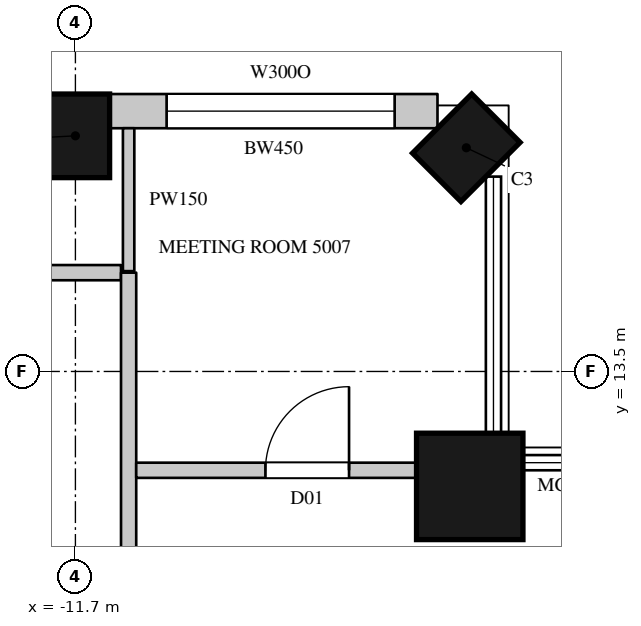
"""IFC4 building model, lengths in metres.
Left out: names, types, materials, properties, quantities, classifications, styles, units other than length and angle.
Written with IfcOpenShell. Run it as: python <this file> out.ifc"""

import sys

from ifc_helpers import new_model, si_unit, direction, frame, frame_2d, origin, origin_2d, place, context, subcontext, project, spatial, rectangle, circle, extrude, element, fill, save


model = new_model("IFC4")
c1 = context("Model", 3, precision=1e-05, world=origin(), true_north=direction((0.0, 1.0)))
c2 = subcontext(c1, "Body", "Model", "MODEL_VIEW")
j1 = project(units=[si_unit("LENGTHUNIT", "METRE"), si_unit("PLANEANGLEUNIT", "RADIAN")], contexts=[c1])
p1 = place(None, origin())
s1 = spatial("IfcSite", under=j1, at=p1, CompositionType="ELEMENT")
p2 = place(p1, origin())
s2 = spatial("IfcBuilding", under=s1, at=p2, CompositionType="ELEMENT")
p3 = place(p2, frame((0.0, 0.0, 226.1)))
s3 = spatial("IfcBuildingStorey", under=s2, at=p3, CompositionType="ELEMENT", Elevation=226.1)
p4 = place(p3, frame((-6.512, 11.988, 0.0), z_axis=(0.0, 0.0, 1.0), x_axis=(1.0, 0.0, 0.0)))
e1 = element("IfcColumn", 1, at=p4, inside=s3, PredefinedType="COLUMN", context=c2, shape_type="SweptSolid", body=[
    extrude(circle(Radius=0.7, at=origin_2d()), origin(), (0.0, 0.0, 1.0), 4.1),
])
for number, where, z_axis, x_axis in (
    (2, (-6.557, 16.443, 0.0), (0.0, 0.0, 1.0), (-0.707, 0.707, 0.0)),
    (3, (-11.7, 16.6, 0.0), (0.0, 0.0, 1.0), (-1.0, 0.0, 0.0)),
):
    element("IfcColumn", number, at=place(p3, frame(where, z_axis=z_axis, x_axis=x_axis)), inside=s3, PredefinedType="COLUMN", context=c2, shape_type="SweptSolid", body=[
        extrude(rectangle(XDim=0.9, YDim=1.1, at=origin_2d()), origin(), (0.0, 0.0, 1.0), 4.1),
    ])
p5 = place(p3, frame((-6.936, 16.925, 0.0), z_axis=(0.0, 0.0, 1.0), x_axis=(-1.0, 0.0, 0.0)))
e4 = element("IfcWall", 4, at=p5, inside=s3, PredefinedType="SOLIDWALL", context=c2, shape_type="SweptSolid", body=[
    extrude(rectangle(XDim=4.314, YDim=0.45, at=frame_2d((2.157, 0.0))), origin(), (0.0, 0.0, 1.0), 3.8),
])
p6 = place(p5, frame((0.564, 0.0, 1.05)))
e5 = element("IfcOpeningElement", 5, at=p6, cuts=e4, PredefinedType="OPENING", context=c2, shape_type="SweptSolid", body=[
    extrude(rectangle(XDim=3.0, YDim=2.4, at=frame_2d((1.5, 1.2))), frame((0.0, 0.235, 0.0), z_axis=(0.0, -1.0, 0.0), x_axis=(1.0, 0.0, 0.0)), (0.0, 0.0, 1.0), 0.47),
])
p7 = place(p3, frame((-13.97, 14.8, 0.0), z_axis=(0.0, 0.0, 1.0), x_axis=(1.0, 0.0, 0.0)))
e6 = element("IfcWall", 6, at=p7, inside=s3, PredefinedType="PARTITIONING", context=c2, shape_type="SweptSolid", body=[
    extrude(rectangle(XDim=2.87, YDim=0.2, at=frame_2d((1.435, 0.0))), origin(), (0.0, 0.0, 1.0), 3.8),
])
p8 = place(p3, frame((-11.0, -14.8, 0.0), z_axis=(0.0, 0.0, 1.0), x_axis=(0.0, 1.0, 0.0)))
e7 = element("IfcWall", 7, at=p8, inside=s3, PredefinedType="PARTITIONING", context=c2, shape_type="SweptSolid", body=[
    extrude(rectangle(XDim=29.6, YDim=0.2, at=frame_2d((14.8, 0.0))), origin(), (0.0, 0.0, 1.0), 3.8),
])
p9 = place(p8, frame((14.45, 0.0, 0.0)))
e8 = element("IfcOpeningElement", 8, at=p9, cuts=e7, PredefinedType="OPENING", context=c2, shape_type="SweptSolid", body=[
    extrude(rectangle(XDim=1.5, YDim=2.4, at=frame_2d((0.75, 1.2))), frame((0.0, 0.11, 0.0), z_axis=(0.0, -1.0, 0.0), x_axis=(1.0, 0.0, 0.0)), (0.0, 0.0, 1.0), 0.22),
])
p10 = place(p3, frame((-10.9, 12.2, 0.0), z_axis=(0.0, 0.0, 1.0), x_axis=(1.0, 0.0, 0.0)))
e9 = element("IfcWall", 9, at=p10, inside=s3, PredefinedType="PARTITIONING", context=c2, shape_type="SweptSolid", body=[
    extrude(rectangle(XDim=3.704, YDim=0.2, at=frame_2d((1.852, 0.0))), origin(), (0.0, 0.0, 1.0), 3.8),
])
p11 = place(p10, frame((1.7, 0.0, 0.0)))
e10 = element("IfcOpeningElement", 10, at=p11, cuts=e9, PredefinedType="OPENING", context=c2, shape_type="SweptSolid", body=[
    extrude(rectangle(XDim=1.1, YDim=2.4, at=frame_2d((0.55, 1.2))), frame((0.0, 0.11, 0.0), z_axis=(0.0, -1.0, 0.0), x_axis=(1.0, 0.0, 0.0)), (0.0, 0.0, 1.0), 0.22),
])
p12 = place(p3, frame((-11.0, 14.82, 0.0), z_axis=(0.0, 0.0, 1.0), x_axis=(0.0, 1.0, 0.0)))
e11 = element("IfcWall", 11, at=p12, inside=s3, PredefinedType="PARTITIONING", context=c2, shape_type="SweptSolid", body=[
    extrude(rectangle(XDim=1.88, YDim=0.15, at=frame_2d((0.94, 0.0))), origin(), (0.0, 0.0, 1.0), 3.8),
])
p13 = place(p6, origin())
e12 = element("IfcWindow", 12, at=p13, inside=s3, PartitioningType="SINGLE_PANEL", PredefinedType="WINDOW", context=c2, shape_type="SweptSolid", body=[
    extrude(rectangle(XDim=3.0, YDim=2.4, at=frame_2d((1.5, 1.2))), frame((0.0, 0.135, 0.0), z_axis=(0.0, -1.0, 0.0), x_axis=(1.0, 0.0, 0.0)), (0.0, 0.0, 1.0), 0.06),
])
fill(e5, e12)
p14 = place(p11, origin())
e13 = element("IfcDoor", 13, at=p14, inside=s3, OperationType="SINGLE_SWING_RIGHT", PredefinedType="DOOR", context=c2, shape_type="SweptSolid", body=[
    extrude(rectangle(XDim=1.1, YDim=2.4, at=frame_2d((0.55, 1.2))), frame((0.0, 0.025, 0.0), z_axis=(0.0, -1.0, 0.0), x_axis=(1.0, 0.0, 0.0)), (0.0, 0.0, 1.0), 0.05),
])
fill(e10, e13)
save(model, sys.argv[1])
